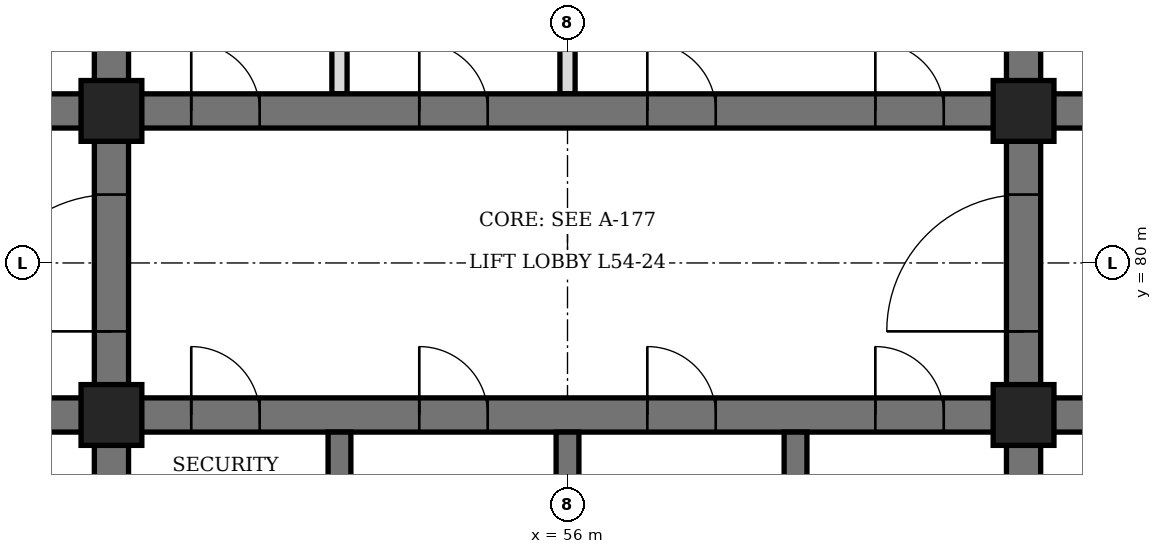
"""IFC4 building model, lengths in metres.
Left out: names, types, materials, properties, quantities, classifications, styles, units other than length and angle.
Written with IfcOpenShell. Run it as: python <this file> out.ifc"""

import sys

from ifc_helpers import new_model, si_unit, direction, frame, frame_2d, origin, origin_2d, place, context, subcontext, project, spatial, rectangle, hollow_rectangle, extrude, element, fill, save


model = new_model("IFC4")
c1 = context("Model", 3, precision=1e-05, world=origin(), true_north=direction((0.0, 1.0)))
c2 = subcontext(c1, "Body", "Model", "MODEL_VIEW")
j1 = project(units=[si_unit("LENGTHUNIT", "METRE"), si_unit("PLANEANGLEUNIT", "RADIAN")], contexts=[c1])
p1 = place(None, origin())
s1 = spatial("IfcSite", under=j1, at=p1, CompositionType="ELEMENT")
p2 = place(p1, origin())
s2 = spatial("IfcBuilding", under=s1, at=p2, CompositionType="ELEMENT")
p3 = place(p2, frame((0.0, 0.0, 240.1)))
s3 = spatial("IfcBuildingStorey", under=s2, at=p3, CompositionType="ELEMENT", Elevation=240.1)
p4 = place(p3, frame((50.0, 71.6, 0.0), z_axis=(0.0, 0.0, 1.0), x_axis=(0.0, 1.0, 0.0)))
e1 = element("IfcWall", 1, at=p4, inside=s3, PredefinedType="SHEAR", context=c2, shape_type="SweptSolid", body=[
    extrude(rectangle(XDim=16.8, YDim=0.45, at=frame_2d((8.4, 0.0))), origin(), (0.0, 0.0, 1.0), 4.2),
])
p5 = place(p4, frame((7.5, 0.0, 0.0)))
e2 = element("IfcOpeningElement", 2, at=p5, cuts=e1, PredefinedType="OPENING", context=c2, shape_type="SweptSolid", body=[
    extrude(rectangle(XDim=1.8, YDim=2.4, at=frame_2d((0.9, 1.2))), frame((0.0, 0.235, 0.0), z_axis=(0.0, -1.0, 0.0), x_axis=(1.0, 0.0, 0.0)), (0.0, 0.0, 1.0), 0.47),
])
p6 = place(p3, frame((62.0, 71.6, 0.0), z_axis=(0.0, 0.0, 1.0), x_axis=(0.0, 1.0, 0.0)))
e3 = element("IfcWall", 3, at=p6, inside=s3, PredefinedType="SHEAR", context=c2, shape_type="SweptSolid", body=[
    extrude(rectangle(XDim=16.8, YDim=0.45, at=frame_2d((8.4, 0.0))), origin(), (0.0, 0.0, 1.0), 4.2),
])
p7 = place(p6, frame((7.5, 0.0, 0.0)))
e4 = element("IfcOpeningElement", 4, at=p7, cuts=e3, PredefinedType="OPENING", context=c2, shape_type="SweptSolid", body=[
    extrude(rectangle(XDim=1.8, YDim=2.4, at=frame_2d((0.9, 1.2))), frame((0.0, 0.235, 0.0), z_axis=(0.0, -1.0, 0.0), x_axis=(1.0, 0.0, 0.0)), (0.0, 0.0, 1.0), 0.47),
])
p8 = place(p3, frame((44.6, 78.0, 0.0), z_axis=(0.0, 0.0, 1.0), x_axis=(1.0, 0.0, 0.0)))
e5 = element("IfcWall", 5, at=p8, inside=s3, PredefinedType="SHEAR", context=c2, shape_type="SweptSolid", body=[
    extrude(rectangle(XDim=5.175, YDim=0.45, at=frame_2d((2.587, 0.0))), origin(), (0.0, 0.0, 1.0), 4.2),
])
p9 = place(p8, frame((1.8, 0.0, 0.0)))
e6 = element("IfcOpeningElement", 6, at=p9, cuts=e5, PredefinedType="OPENING", context=c2, shape_type="SweptSolid", body=[
    extrude(rectangle(XDim=1.2, YDim=2.1, at=frame_2d((0.6, 1.05))), frame((0.0, 0.235, 0.0), z_axis=(0.0, -1.0, 0.0), x_axis=(1.0, 0.0, 0.0)), (0.0, 0.0, 1.0), 0.47),
])
p10 = place(p3, frame((44.6, 82.0, 0.0), z_axis=(0.0, 0.0, 1.0), x_axis=(1.0, 0.0, 0.0)))
e7 = element("IfcWall", 7, at=p10, inside=s3, PredefinedType="SHEAR", context=c2, shape_type="SweptSolid", body=[
    extrude(rectangle(XDim=5.175, YDim=0.45, at=frame_2d((2.587, 0.0))), origin(), (0.0, 0.0, 1.0), 4.2),
])
p11 = place(p10, frame((0.7, 0.0, 0.0)))
e8 = element("IfcOpeningElement", 8, at=p11, cuts=e7, PredefinedType="OPENING", context=c2, shape_type="SweptSolid", body=[
    extrude(rectangle(XDim=0.9, YDim=2.1, at=frame_2d((0.45, 1.05))), frame((0.0, 0.235, 0.0), z_axis=(0.0, -1.0, 0.0), x_axis=(1.0, 0.0, 0.0)), (0.0, 0.0, 1.0), 0.47),
])
p12 = place(p3, frame((62.225, 78.0, 0.0), z_axis=(0.0, 0.0, 1.0), x_axis=(1.0, 0.0, 0.0)))
e9 = element("IfcWall", 9, at=p12, inside=s3, PredefinedType="SHEAR", context=c2, shape_type="SweptSolid", body=[
    extrude(rectangle(XDim=5.175, YDim=0.45, at=frame_2d((2.587, 0.0))), origin(), (0.0, 0.0, 1.0), 4.2),
])
p13 = place(p12, frame((2.175, 0.0, 0.0)))
e10 = element("IfcOpeningElement", 10, at=p13, cuts=e9, PredefinedType="OPENING", context=c2, shape_type="SweptSolid", body=[
    extrude(rectangle(XDim=1.2, YDim=2.1, at=frame_2d((0.6, 1.05))), frame((0.0, 0.235, 0.0), z_axis=(0.0, -1.0, 0.0), x_axis=(1.0, 0.0, 0.0)), (0.0, 0.0, 1.0), 0.47),
])
p14 = place(p3, frame((62.225, 82.0, 0.0), z_axis=(0.0, 0.0, 1.0), x_axis=(1.0, 0.0, 0.0)))
e11 = element("IfcWall", 11, at=p14, inside=s3, PredefinedType="SHEAR", context=c2, shape_type="SweptSolid", body=[
    extrude(rectangle(XDim=5.175, YDim=0.45, at=frame_2d((2.587, 0.0))), origin(), (0.0, 0.0, 1.0), 4.2),
])
p15 = place(p14, frame((2.175, 0.0, 0.0)))
e12 = element("IfcOpeningElement", 12, at=p15, cuts=e11, PredefinedType="OPENING", context=c2, shape_type="SweptSolid", body=[
    extrude(rectangle(XDim=1.2, YDim=2.1, at=frame_2d((0.6, 1.05))), frame((0.0, 0.235, 0.0), z_axis=(0.0, -1.0, 0.0), x_axis=(1.0, 0.0, 0.0)), (0.0, 0.0, 1.0), 0.47),
])
p16 = place(p3, frame((50.225, 78.0, 0.0), z_axis=(0.0, 0.0, 1.0), x_axis=(1.0, 0.0, 0.0)))
e13 = element("IfcWall", 13, at=p16, inside=s3, PredefinedType="SHEAR", context=c2, shape_type="SweptSolid", body=[
    extrude(rectangle(XDim=11.55, YDim=0.45, at=frame_2d((5.775, 0.0))), origin(), (0.0, 0.0, 1.0), 4.2),
])
p17 = place(p16, frame((0.825, 0.0, 0.0)))
e14 = element("IfcOpeningElement", 14, at=p17, cuts=e13, PredefinedType="OPENING", context=c2, shape_type="SweptSolid", body=[
    extrude(rectangle(XDim=0.9, YDim=2.1, at=frame_2d((0.45, 1.05))), frame((0.0, 0.235, 0.0), z_axis=(0.0, -1.0, 0.0), x_axis=(1.0, 0.0, 0.0)), (0.0, 0.0, 1.0), 0.47),
])
p18 = place(p16, frame((3.825, 0.0, 0.0)))
e15 = element("IfcOpeningElement", 15, at=p18, cuts=e13, PredefinedType="OPENING", context=c2, shape_type="SweptSolid", body=[
    extrude(rectangle(XDim=0.9, YDim=2.1, at=frame_2d((0.45, 1.05))), frame((0.0, 0.235, 0.0), z_axis=(0.0, -1.0, 0.0), x_axis=(1.0, 0.0, 0.0)), (0.0, 0.0, 1.0), 0.47),
])
p19 = place(p16, frame((6.825, 0.0, 0.0)))
e16 = element("IfcOpeningElement", 16, at=p19, cuts=e13, PredefinedType="OPENING", context=c2, shape_type="SweptSolid", body=[
    extrude(rectangle(XDim=0.9, YDim=2.1, at=frame_2d((0.45, 1.05))), frame((0.0, 0.235, 0.0), z_axis=(0.0, -1.0, 0.0), x_axis=(1.0, 0.0, 0.0)), (0.0, 0.0, 1.0), 0.47),
])
p20 = place(p16, frame((9.825, 0.0, 0.0)))
e17 = element("IfcOpeningElement", 17, at=p20, cuts=e13, PredefinedType="OPENING", context=c2, shape_type="SweptSolid", body=[
    extrude(rectangle(XDim=0.9, YDim=2.1, at=frame_2d((0.45, 1.05))), frame((0.0, 0.235, 0.0), z_axis=(0.0, -1.0, 0.0), x_axis=(1.0, 0.0, 0.0)), (0.0, 0.0, 1.0), 0.47),
])
p21 = place(p3, frame((50.225, 82.0, 0.0), z_axis=(0.0, 0.0, 1.0), x_axis=(1.0, 0.0, 0.0)))
e18 = element("IfcWall", 18, at=p21, inside=s3, PredefinedType="SHEAR", context=c2, shape_type="SweptSolid", body=[
    extrude(rectangle(XDim=11.55, YDim=0.45, at=frame_2d((5.775, 0.0))), origin(), (0.0, 0.0, 1.0), 4.2),
])
p22 = place(p21, frame((0.825, 0.0, 0.0)))
e19 = element("IfcOpeningElement", 19, at=p22, cuts=e18, PredefinedType="OPENING", context=c2, shape_type="SweptSolid", body=[
    extrude(rectangle(XDim=0.9, YDim=2.1, at=frame_2d((0.45, 1.05))), frame((0.0, 0.235, 0.0), z_axis=(0.0, -1.0, 0.0), x_axis=(1.0, 0.0, 0.0)), (0.0, 0.0, 1.0), 0.47),
])
p23 = place(p21, frame((3.825, 0.0, 0.0)))
e20 = element("IfcOpeningElement", 20, at=p23, cuts=e18, PredefinedType="OPENING", context=c2, shape_type="SweptSolid", body=[
    extrude(rectangle(XDim=0.9, YDim=2.1, at=frame_2d((0.45, 1.05))), frame((0.0, 0.235, 0.0), z_axis=(0.0, -1.0, 0.0), x_axis=(1.0, 0.0, 0.0)), (0.0, 0.0, 1.0), 0.47),
])
p24 = place(p21, frame((6.825, 0.0, 0.0)))
e21 = element("IfcOpeningElement", 21, at=p24, cuts=e18, PredefinedType="OPENING", context=c2, shape_type="SweptSolid", body=[
    extrude(rectangle(XDim=0.9, YDim=2.1, at=frame_2d((0.45, 1.05))), frame((0.0, 0.235, 0.0), z_axis=(0.0, -1.0, 0.0), x_axis=(1.0, 0.0, 0.0)), (0.0, 0.0, 1.0), 0.47),
])
p25 = place(p21, frame((9.825, 0.0, 0.0)))
e22 = element("IfcOpeningElement", 22, at=p25, cuts=e18, PredefinedType="OPENING", context=c2, shape_type="SweptSolid", body=[
    extrude(rectangle(XDim=0.9, YDim=2.1, at=frame_2d((0.45, 1.05))), frame((0.0, 0.235, 0.0), z_axis=(0.0, -1.0, 0.0), x_axis=(1.0, 0.0, 0.0)), (0.0, 0.0, 1.0), 0.47),
])
for number, where, z_axis, x_axis in (
    (23, (53.0, 74.15, 0.0), (0.0, 0.0, 1.0), (0.0, 1.0, 0.0)),
    (24, (56.0, 74.15, 0.0), (0.0, 0.0, 1.0), (0.0, 1.0, 0.0)),
    (25, (59.0, 74.15, 0.0), (0.0, 0.0, 1.0), (0.0, 1.0, 0.0)),
):
    element("IfcWall", number, at=place(p3, frame(where, z_axis=z_axis, x_axis=x_axis)), inside=s3, PredefinedType="SHEAR", context=c2, shape_type="SweptSolid", body=[
        extrude(rectangle(XDim=3.625, YDim=0.3, at=frame_2d((1.812, 0.0))), origin(), (0.0, 0.0, 1.0), 4.2),
    ])
for number, where, z_axis, x_axis in (
    (26, (50.0, 78.0, 0.0), (0.0, 0.0, 1.0), (1.0, 0.0, 0.0)),
    (27, (50.0, 82.0, 0.0), (0.0, 0.0, 1.0), (1.0, 0.0, 0.0)),
    (28, (62.0, 78.0, 0.0), (0.0, 0.0, 1.0), (1.0, 0.0, 0.0)),
    (29, (62.0, 82.0, 0.0), (0.0, 0.0, 1.0), (1.0, 0.0, 0.0)),
):
    element("IfcColumn", number, at=place(p3, frame(where, z_axis=z_axis, x_axis=x_axis)), inside=s3, PredefinedType="COLUMN", context=c2, shape_type="SweptSolid", body=[
        extrude(hollow_rectangle(XDim=0.8, YDim=0.8, WallThickness=0.1, at=origin_2d()), origin(), (0.0, 0.0, 1.0), 4.2),
    ])
p26 = place(p3, frame((53.0, 82.225, 0.0), z_axis=(0.0, 0.0, 1.0), x_axis=(0.0, 1.0, 0.0)))
e30 = element("IfcWall", 30, at=p26, inside=s3, PredefinedType="PARTITIONING", context=c2, shape_type="SweptSolid", body=[
    extrude(rectangle(XDim=3.55, YDim=0.2, at=frame_2d((1.775, 0.0))), origin(), (0.0, 0.0, 1.0), 3.95),
])
p27 = place(p3, frame((56.0, 82.225, 0.0), z_axis=(0.0, 0.0, 1.0), x_axis=(0.0, 1.0, 0.0)))
e31 = element("IfcWall", 31, at=p27, inside=s3, PredefinedType="PARTITIONING", context=c2, shape_type="SweptSolid", body=[
    extrude(rectangle(XDim=3.55, YDim=0.2, at=frame_2d((1.775, 0.0))), origin(), (0.0, 0.0, 1.0), 3.05),
])
p28 = place(p17, origin())
e32 = element("IfcDoor", 32, at=p28, inside=s3, OperationType="SINGLE_SWING_LEFT", PredefinedType="DOOR", context=c2, shape_type="SweptSolid", body=[
    extrude(rectangle(XDim=0.9, YDim=2.1, at=frame_2d((0.45, 1.05))), frame((0.0, 0.225, 0.0), z_axis=(0.0, -1.0, 0.0), x_axis=(1.0, 0.0, 0.0)), (0.0, 0.0, 1.0), 0.449),
])
fill(e14, e32)
p29 = place(p18, origin())
e33 = element("IfcDoor", 33, at=p29, inside=s3, OperationType="SINGLE_SWING_LEFT", PredefinedType="DOOR", context=c2, shape_type="SweptSolid", body=[
    extrude(rectangle(XDim=0.9, YDim=2.1, at=frame_2d((0.45, 1.05))), frame((0.0, 0.225, 0.0), z_axis=(0.0, -1.0, 0.0), x_axis=(1.0, 0.0, 0.0)), (0.0, 0.0, 1.0), 0.449),
])
fill(e15, e33)
p30 = place(p19, origin())
e34 = element("IfcDoor", 34, at=p30, inside=s3, OperationType="SINGLE_SWING_LEFT", PredefinedType="DOOR", context=c2, shape_type="SweptSolid", body=[
    extrude(rectangle(XDim=0.9, YDim=2.1, at=frame_2d((0.45, 1.05))), frame((0.0, 0.225, 0.0), z_axis=(0.0, -1.0, 0.0), x_axis=(1.0, 0.0, 0.0)), (0.0, 0.0, 1.0), 0.449),
])
fill(e16, e34)
p31 = place(p20, origin())
e35 = element("IfcDoor", 35, at=p31, inside=s3, OperationType="SINGLE_SWING_LEFT", PredefinedType="DOOR", context=c2, shape_type="SweptSolid", body=[
    extrude(rectangle(XDim=0.9, YDim=2.1, at=frame_2d((0.45, 1.05))), frame((0.0, 0.225, 0.0), z_axis=(0.0, -1.0, 0.0), x_axis=(1.0, 0.0, 0.0)), (0.0, 0.0, 1.0), 0.449),
])
fill(e17, e35)
p32 = place(p22, origin())
e36 = element("IfcDoor", 36, at=p32, inside=s3, OperationType="SINGLE_SWING_LEFT", PredefinedType="DOOR", context=c2, shape_type="SweptSolid", body=[
    extrude(rectangle(XDim=0.9, YDim=2.1, at=frame_2d((0.45, 1.05))), frame((0.0, 0.225, 0.0), z_axis=(0.0, -1.0, 0.0), x_axis=(1.0, 0.0, 0.0)), (0.0, 0.0, 1.0), 0.449),
])
fill(e19, e36)
p33 = place(p23, origin())
e37 = element("IfcDoor", 37, at=p33, inside=s3, OperationType="SINGLE_SWING_LEFT", PredefinedType="DOOR", context=c2, shape_type="SweptSolid", body=[
    extrude(rectangle(XDim=0.9, YDim=2.1, at=frame_2d((0.45, 1.05))), frame((0.0, 0.225, 0.0), z_axis=(0.0, -1.0, 0.0), x_axis=(1.0, 0.0, 0.0)), (0.0, 0.0, 1.0), 0.449),
])
fill(e20, e37)
p34 = place(p24, origin())
e38 = element("IfcDoor", 38, at=p34, inside=s3, OperationType="SINGLE_SWING_LEFT", PredefinedType="DOOR", context=c2, shape_type="SweptSolid", body=[
    extrude(rectangle(XDim=0.9, YDim=2.1, at=frame_2d((0.45, 1.05))), frame((0.0, 0.225, 0.0), z_axis=(0.0, -1.0, 0.0), x_axis=(1.0, 0.0, 0.0)), (0.0, 0.0, 1.0), 0.449),
])
fill(e21, e38)
p35 = place(p25, origin())
e39 = element("IfcDoor", 39, at=p35, inside=s3, OperationType="SINGLE_SWING_LEFT", PredefinedType="DOOR", context=c2, shape_type="SweptSolid", body=[
    extrude(rectangle(XDim=0.9, YDim=2.1, at=frame_2d((0.45, 1.05))), frame((0.0, 0.225, 0.0), z_axis=(0.0, -1.0, 0.0), x_axis=(1.0, 0.0, 0.0)), (0.0, 0.0, 1.0), 0.449),
])
fill(e22, e39)
p36 = place(p5, origin())
e40 = element("IfcDoor", 40, at=p36, inside=s3, OperationType="DOUBLE_DOOR_SINGLE_SWING", PredefinedType="DOOR", context=c2, shape_type="SweptSolid", body=[
    extrude(rectangle(XDim=1.8, YDim=2.4, at=frame_2d((0.9, 1.2))), frame((0.0, 0.225, 0.0), z_axis=(0.0, -1.0, 0.0), x_axis=(1.0, 0.0, 0.0)), (0.0, 0.0, 1.0), 0.449),
])
fill(e2, e40)
p37 = place(p7, origin())
e41 = element("IfcDoor", 41, at=p37, inside=s3, OperationType="DOUBLE_DOOR_SINGLE_SWING", PredefinedType="DOOR", context=c2, shape_type="SweptSolid", body=[
    extrude(rectangle(XDim=1.8, YDim=2.4, at=frame_2d((0.9, 1.2))), frame((0.0, 0.225, 0.0), z_axis=(0.0, -1.0, 0.0), x_axis=(1.0, 0.0, 0.0)), (0.0, 0.0, 1.0), 0.449),
])
fill(e4, e41)
save(model, sys.argv[1])
